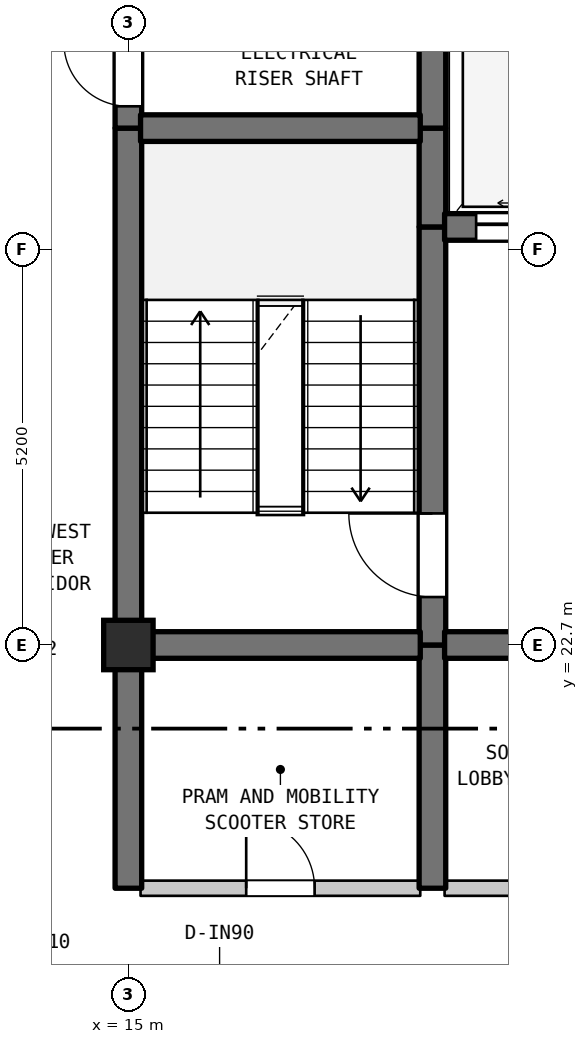
"""IFC4 building model, lengths in metres.
Left out: names, types, materials, properties, quantities, classifications, styles, units other than length and angle.
Written with IfcOpenShell. Run it as: python <this file> out.ifc"""

import sys

from ifc_helpers import new_model, si_unit, direction, frame, frame_2d, origin, origin_2d, place, context, subcontext, project, spatial, rectangle, extrude, element, fill, save


model = new_model("IFC4")
c1 = context("Model", 3, precision=1e-05, world=origin(), true_north=direction((0.0, 1.0)))
c2 = subcontext(c1, "Body", "Model", "MODEL_VIEW")
j1 = project(units=[si_unit("LENGTHUNIT", "METRE"), si_unit("PLANEANGLEUNIT", "RADIAN")], contexts=[c1])
p1 = place(None, origin())
s1 = spatial("IfcSite", under=j1, at=p1, CompositionType="ELEMENT")
p2 = place(p1, origin())
s2 = spatial("IfcBuilding", under=s1, at=p2, CompositionType="ELEMENT")
p3 = place(p2, frame((0.0, 0.0, 295.4)))
s3 = spatial("IfcBuildingStorey", under=s2, at=p3, CompositionType="ELEMENT", Elevation=295.4)
p4 = place(p3, frame((15.0, 22.7, 0.0), z_axis=(0.0, 0.0, 1.0), x_axis=(1.0, 0.0, 0.0)))
e1 = element("IfcColumn", 1, at=p4, inside=s3, PredefinedType="COLUMN", context=c2, shape_type="SweptSolid", body=[
    extrude(rectangle(XDim=0.65, YDim=0.65, at=origin_2d()), origin(), (0.0, 0.0, 1.0), 3.7),
])
p5 = place(p3, frame((15.0, 19.5, 0.0), z_axis=(0.0, 0.0, 1.0), x_axis=(0.0, 1.0, 0.0)))
e2 = element("IfcWall", 2, at=p5, inside=s3, PredefinedType="SHEAR", context=c2, shape_type="SweptSolid", body=[
    extrude(rectangle(XDim=3.2, YDim=0.35, at=frame_2d((1.6, 0.0))), origin(), (0.0, 0.0, 1.0), 3.38),
])
p6 = place(p3, frame((15.0, 22.7, 0.0), z_axis=(0.0, 0.0, 1.0), x_axis=(0.0, 1.0, 0.0)))
e3 = element("IfcWall", 3, at=p6, inside=s3, PredefinedType="SHEAR", context=c2, shape_type="SweptSolid", body=[
    extrude(rectangle(XDim=6.8, YDim=0.35, at=frame_2d((3.4, 0.0))), origin(), (0.0, 0.0, 1.0), 3.38),
])
p7 = place(p3, frame((15.0, 29.5, 0.0), z_axis=(0.0, 0.0, 1.0), x_axis=(0.0, 1.0, 0.0)))
e4 = element("IfcWall", 4, at=p7, inside=s3, PredefinedType="SHEAR", context=c2, shape_type="SweptSolid", body=[
    extrude(rectangle(XDim=1.6, YDim=0.35, at=frame_2d((0.8, 0.0))), origin(), (0.0, 0.0, 1.0), 3.38),
])
p8 = place(p7, frame((0.287, 0.0, 0.0)))
e5 = element("IfcOpeningElement", 5, at=p8, cuts=e4, PredefinedType="OPENING", context=c2, shape_type="SweptSolid", body=[
    extrude(rectangle(XDim=0.85, YDim=2.1, at=frame_2d((0.425, 1.05))), frame((0.0, 0.185, 0.0), z_axis=(0.0, -1.0, 0.0), x_axis=(1.0, 0.0, 0.0)), (0.0, 0.0, 1.0), 0.37),
])
p9 = place(p3, frame((19.0, 19.5, 0.0), z_axis=(0.0, 0.0, 1.0), x_axis=(0.0, 1.0, 0.0)))
e6 = element("IfcWall", 6, at=p9, inside=s3, PredefinedType="SHEAR", context=c2, shape_type="SweptSolid", body=[
    extrude(rectangle(XDim=3.2, YDim=0.35, at=frame_2d((1.6, 0.0))), origin(), (0.0, 0.0, 1.0), 3.38),
])
p10 = place(p3, frame((19.0, 22.7, 0.0), z_axis=(0.0, 0.0, 1.0), x_axis=(0.0, 1.0, 0.0)))
e7 = element("IfcWall", 7, at=p10, inside=s3, PredefinedType="SHEAR", context=c2, shape_type="SweptSolid", body=[
    extrude(rectangle(XDim=5.5, YDim=0.35, at=frame_2d((2.75, 0.0))), origin(), (0.0, 0.0, 1.0), 3.38),
])
p11 = place(p10, frame((0.631, 0.0, 0.0)))
e8 = element("IfcOpeningElement", 8, at=p11, cuts=e7, PredefinedType="OPENING", context=c2, shape_type="SweptSolid", body=[
    extrude(rectangle(XDim=1.1, YDim=2.15, at=frame_2d((0.55, 1.075))), frame((0.0, 0.185, 0.0), z_axis=(0.0, -1.0, 0.0), x_axis=(1.0, 0.0, 0.0)), (0.0, 0.0, 1.0), 0.37),
])
p12 = place(p3, frame((19.0, 28.2, 0.0), z_axis=(0.0, 0.0, 1.0), x_axis=(0.0, 1.0, 0.0)))
e9 = element("IfcWall", 9, at=p12, inside=s3, PredefinedType="SHEAR", context=c2, shape_type="SweptSolid", body=[
    extrude(rectangle(XDim=1.3, YDim=0.35, at=frame_2d((0.65, 0.0))), origin(), (0.0, 0.0, 1.0), 3.38),
])
p13 = place(p3, frame((19.0, 29.5, 0.0), z_axis=(0.0, 0.0, 1.0), x_axis=(0.0, 1.0, 0.0)))
e10 = element("IfcWall", 10, at=p13, inside=s3, PredefinedType="SHEAR", context=c2, shape_type="SweptSolid", body=[
    extrude(rectangle(XDim=5.5, YDim=0.35, at=frame_2d((2.75, 0.0))), origin(), (0.0, 0.0, 1.0), 3.38),
])
p14 = place(p13, frame((2.025, 0.0, 0.0)))
e11 = element("IfcOpeningElement", 11, at=p14, cuts=e10, PredefinedType="OPENING", context=c2, shape_type="SweptSolid", body=[
    extrude(rectangle(XDim=1.1, YDim=2.15, at=frame_2d((0.55, 1.075))), frame((0.0, 0.185, 0.0), z_axis=(0.0, -1.0, 0.0), x_axis=(1.0, 0.0, 0.0)), (0.0, 0.0, 1.0), 0.37),
])
p15 = place(p3, frame((15.16, 19.5, 0.0), z_axis=(0.0, 0.0, 1.0), x_axis=(1.0, 0.0, 0.0)))
e12 = element("IfcWall", 12, at=p15, inside=s3, PredefinedType="STANDARD", context=c2, shape_type="SweptSolid", body=[
    extrude(rectangle(XDim=3.68, YDim=0.2, at=frame_2d((1.84, 0.0))), origin(), (0.0, 0.0, 1.0), 3.38),
])
p16 = place(p15, frame((1.39, 0.0, 0.0)))
e13 = element("IfcOpeningElement", 13, at=p16, cuts=e12, PredefinedType="OPENING", context=c2, shape_type="SweptSolid", body=[
    extrude(rectangle(XDim=0.9, YDim=2.15, at=frame_2d((0.45, 1.075))), frame((0.0, 0.11, 0.0), z_axis=(0.0, -1.0, 0.0), x_axis=(1.0, 0.0, 0.0)), (0.0, 0.0, 1.0), 0.22),
])
p17 = place(p3, frame((19.16, 19.5, 0.0), z_axis=(0.0, 0.0, 1.0), x_axis=(1.0, 0.0, 0.0)))
e14 = element("IfcWall", 14, at=p17, inside=s3, PredefinedType="STANDARD", context=c2, shape_type="SweptSolid", body=[
    extrude(rectangle(XDim=4.48, YDim=0.2, at=frame_2d((2.24, 0.0))), origin(), (0.0, 0.0, 1.0), 3.38),
])
p18 = place(p17, frame((1.64, 0.0, 0.0)))
e15 = element("IfcOpeningElement", 15, at=p18, cuts=e14, PredefinedType="OPENING", context=c2, shape_type="SweptSolid", body=[
    extrude(rectangle(XDim=1.2, YDim=2.2, at=frame_2d((0.6, 1.1))), frame((0.0, 0.11, 0.0), z_axis=(0.0, -1.0, 0.0), x_axis=(1.0, 0.0, 0.0)), (0.0, 0.0, 1.0), 0.22),
])
p19 = place(p3, frame((15.16, 22.7, 0.0), z_axis=(0.0, 0.0, 1.0), x_axis=(1.0, 0.0, 0.0)))
e16 = element("IfcWall", 16, at=p19, inside=s3, PredefinedType="SHEAR", context=c2, shape_type="SweptSolid", body=[
    extrude(rectangle(XDim=3.68, YDim=0.35, at=frame_2d((1.84, 0.0))), origin(), (0.0, 0.0, 1.0), 3.38),
])
p20 = place(p3, frame((19.16, 22.7, 0.0), z_axis=(0.0, 0.0, 1.0), x_axis=(1.0, 0.0, 0.0)))
e17 = element("IfcWall", 17, at=p20, inside=s3, PredefinedType="SHEAR", context=c2, shape_type="SweptSolid", body=[
    extrude(rectangle(XDim=4.48, YDim=0.35, at=frame_2d((2.24, 0.0))), origin(), (0.0, 0.0, 1.0), 3.38),
])
p21 = place(p20, frame((1.64, 0.0, 0.0)))
e18 = element("IfcOpeningElement", 18, at=p21, cuts=e17, PredefinedType="OPENING", context=c2, shape_type="SweptSolid", body=[
    extrude(rectangle(XDim=1.2, YDim=2.2, at=frame_2d((0.6, 1.1))), frame((0.0, 0.185, 0.0), z_axis=(0.0, -1.0, 0.0), x_axis=(1.0, 0.0, 0.0)), (0.0, 0.0, 1.0), 0.37),
])
p22 = place(p3, frame((19.16, 28.2, 0.0), z_axis=(0.0, 0.0, 1.0), x_axis=(1.0, 0.0, 0.0)))
e19 = element("IfcWall", 19, at=p22, inside=s3, PredefinedType="SHEAR", context=c2, shape_type="SweptSolid", body=[
    extrude(rectangle(XDim=4.48, YDim=0.35, at=frame_2d((2.24, 0.0))), origin(), (0.0, 0.0, 1.0), 3.38),
])
p23 = place(p22, frame((0.415, 0.0, 0.0)))
e20 = element("IfcOpeningElement", 20, at=p23, cuts=e19, PredefinedType="OPENING", context=c2, shape_type="SweptSolid", body=[
    extrude(rectangle(XDim=1.25, YDim=2.2, at=frame_2d((0.625, 1.1))), frame((0.0, 0.185, 0.0), z_axis=(0.0, -1.0, 0.0), x_axis=(1.0, 0.0, 0.0)), (0.0, 0.0, 1.0), 0.37),
])
p24 = place(p22, frame((2.815, 0.0, 0.0)))
e21 = element("IfcOpeningElement", 21, at=p24, cuts=e19, PredefinedType="OPENING", context=c2, shape_type="SweptSolid", body=[
    extrude(rectangle(XDim=1.25, YDim=2.2, at=frame_2d((0.625, 1.1))), frame((0.0, 0.185, 0.0), z_axis=(0.0, -1.0, 0.0), x_axis=(1.0, 0.0, 0.0)), (0.0, 0.0, 1.0), 0.37),
])
p25 = place(p3, frame((15.16, 29.5, 0.0), z_axis=(0.0, 0.0, 1.0), x_axis=(1.0, 0.0, 0.0)))
e22 = element("IfcWall", 22, at=p25, inside=s3, PredefinedType="SHEAR", context=c2, shape_type="SweptSolid", body=[
    extrude(rectangle(XDim=3.68, YDim=0.35, at=frame_2d((1.84, 0.0))), origin(), (0.0, 0.0, 1.0), 3.38),
])
p26 = place(p8, origin())
e23 = element("IfcDoor", 23, at=p26, inside=s3, OperationType="SINGLE_SWING_RIGHT", PredefinedType="DOOR", context=c2, shape_type="SweptSolid", body=[
    extrude(rectangle(XDim=0.85, YDim=2.1, at=frame_2d((0.425, 1.05))), frame((0.0, 0.025, 0.0), z_axis=(0.0, -1.0, 0.0), x_axis=(1.0, 0.0, 0.0)), (0.0, 0.0, 1.0), 0.05),
])
fill(e5, e23)
p27 = place(p11, origin())
e24 = element("IfcDoor", 24, at=p27, inside=s3, OperationType="SINGLE_SWING_RIGHT", PredefinedType="DOOR", context=c2, shape_type="SweptSolid", body=[
    extrude(rectangle(XDim=1.1, YDim=2.15, at=frame_2d((0.55, 1.075))), frame((0.0, 0.025, 0.0), z_axis=(0.0, -1.0, 0.0), x_axis=(1.0, 0.0, 0.0)), (0.0, 0.0, 1.0), 0.05),
])
fill(e8, e24)
p28 = place(p16, origin())
e25 = element("IfcDoor", 25, at=p28, inside=s3, OperationType="SINGLE_SWING_LEFT", PredefinedType="DOOR", context=c2, shape_type="SweptSolid", body=[
    extrude(rectangle(XDim=0.9, YDim=2.15, at=frame_2d((0.45, 1.075))), frame((0.0, 0.025, 0.0), z_axis=(0.0, -1.0, 0.0), x_axis=(1.0, 0.0, 0.0)), (0.0, 0.0, 1.0), 0.05),
])
fill(e13, e25)
p29 = place(p23, origin())
e26 = element("IfcDoor", 26, at=p29, inside=s3, OperationType="DOUBLE_DOOR_SLIDING", PredefinedType="DOOR", context=c2, shape_type="SweptSolid", body=[
    extrude(rectangle(XDim=1.25, YDim=2.2, at=frame_2d((0.625, 1.1))), frame((0.0, 0.025, 0.0), z_axis=(0.0, -1.0, 0.0), x_axis=(1.0, 0.0, 0.0)), (0.0, 0.0, 1.0), 0.05),
])
fill(e20, e26)
save(model, sys.argv[1])
